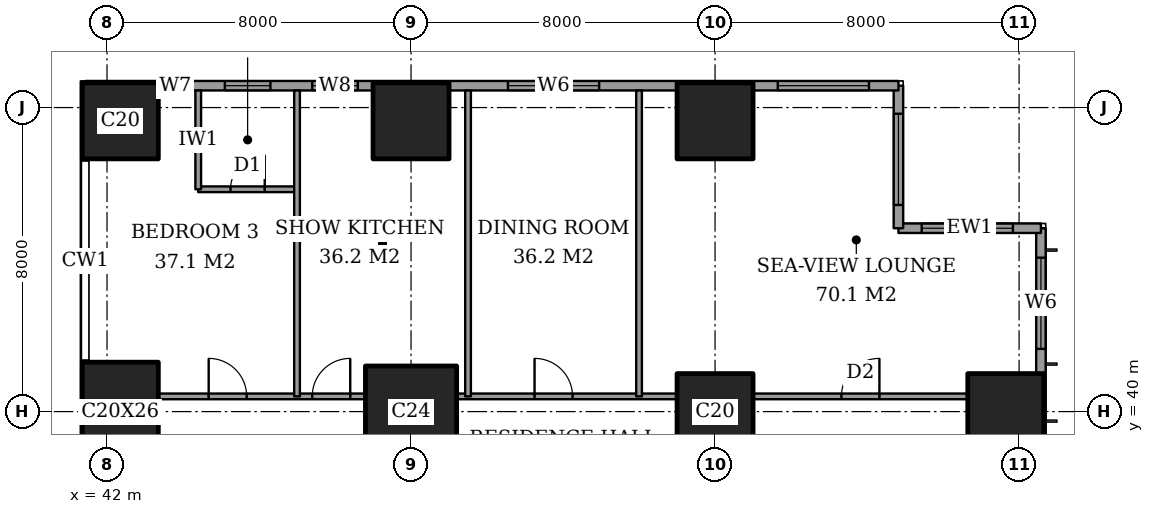
"""IFC4 building model, lengths in metres.
Left out: names, types, materials, properties, quantities, classifications, styles, units other than length and angle.
Written with IfcOpenShell. Run it as: python <this file> out.ifc"""

import sys

from ifc_helpers import new_model, si_unit, direction, frame, frame_2d, origin, origin_2d, place, context, subcontext, project, spatial, rectangle, extrude, element, fill, save


model = new_model("IFC4")
c1 = context("Model", 3, precision=1e-05, world=origin(), true_north=direction((0.0, 1.0)))
c2 = subcontext(c1, "Body", "Model", "MODEL_VIEW")
j1 = project(units=[si_unit("LENGTHUNIT", "METRE"), si_unit("PLANEANGLEUNIT", "RADIAN")], contexts=[c1])
p1 = place(None, origin())
s1 = spatial("IfcSite", under=j1, at=p1, CompositionType="ELEMENT")
p2 = place(p1, origin())
s2 = spatial("IfcBuilding", under=s1, at=p2, CompositionType="ELEMENT")
p3 = place(p2, frame((0.0, 0.0, 72.8)))
s3 = spatial("IfcBuildingStorey", under=s2, at=p3, CompositionType="ELEMENT", Elevation=72.8)
p4 = place(p3, frame((42.35, 40.0, 0.0), z_axis=(0.0, 0.0, 1.0), x_axis=(1.0, 0.0, 0.0)))
e1 = element("IfcColumn", 1, at=p4, inside=s3, PredefinedType="COLUMN", context=c2, shape_type="SweptSolid", body=[
    extrude(rectangle(XDim=2.0, YDim=2.6, at=origin_2d()), origin(), (0.0, 0.0, 1.0), 3.6),
])
p5 = place(p3, frame((42.35, 47.65, 0.0), z_axis=(0.0, 0.0, 1.0), x_axis=(1.0, 0.0, 0.0)))
e2 = element("IfcColumn", 2, at=p5, inside=s3, PredefinedType="COLUMN", context=c2, shape_type="SweptSolid", body=[
    extrude(rectangle(XDim=2.0, YDim=2.0, at=origin_2d()), origin(), (0.0, 0.0, 1.0), 3.6),
])
p6 = place(p3, frame((50.0, 40.0, 0.0), z_axis=(0.0, 0.0, 1.0), x_axis=(1.0, 0.0, 0.0)))
e3 = element("IfcColumn", 3, at=p6, inside=s3, PredefinedType="COLUMN", context=c2, shape_type="SweptSolid", body=[
    extrude(rectangle(XDim=2.4, YDim=2.4, at=origin_2d()), origin(), (0.0, 0.0, 1.0), 3.6),
])
for number, where, z_axis, x_axis in (
    (4, (50.0, 47.65, 0.0), (0.0, 0.0, 1.0), (1.0, 0.0, 0.0)),
    (5, (58.0, 40.0, 0.0), (0.0, 0.0, 1.0), (1.0, 0.0, 0.0)),
    (6, (58.0, 47.65, 0.0), (0.0, 0.0, 1.0), (1.0, 0.0, 0.0)),
    (7, (65.65, 40.0, 0.0), (0.0, 0.0, 1.0), (1.0, 0.0, 0.0)),
):
    element("IfcColumn", number, at=place(p3, frame(where, z_axis=z_axis, x_axis=x_axis)), inside=s3, PredefinedType="COLUMN", context=c2, shape_type="SweptSolid", body=[
        extrude(rectangle(XDim=2.0, YDim=2.0, at=origin_2d()), origin(), (0.0, 0.0, 1.0), 3.6),
    ])
p7 = place(p3, frame((66.575, 3.175, 0.0), z_axis=(0.0, 0.0, 1.0), x_axis=(0.0, 1.0, 0.0)))
e8 = element("IfcWall", 8, at=p7, inside=s3, PredefinedType="SOLIDWALL", context=c2, shape_type="SweptSolid", body=[
    extrude(rectangle(XDim=41.65, YDim=0.25, at=frame_2d((20.825, 0.0))), origin(), (0.0, 0.0, 1.0), 3.6),
])
p8 = place(p7, frame((0.775, 0.0, 0.6)))
e9 = element("IfcOpeningElement", 9, at=p8, cuts=e8, PredefinedType="OPENING", context=c2, shape_type="SweptSolid", body=[
    extrude(rectangle(XDim=2.4, YDim=2.0, at=frame_2d((1.2, 1.0))), frame((0.0, 0.135, 0.0), z_axis=(0.0, -1.0, 0.0), x_axis=(1.0, 0.0, 0.0)), (0.0, 0.0, 1.0), 0.27),
])
p9 = place(p7, frame((6.1, 0.0, 0.6)))
e10 = element("IfcOpeningElement", 10, at=p9, cuts=e8, PredefinedType="OPENING", context=c2, shape_type="SweptSolid", body=[
    extrude(rectangle(XDim=1.2, YDim=2.0, at=frame_2d((0.6, 1.0))), frame((0.0, 0.135, 0.0), z_axis=(0.0, -1.0, 0.0), x_axis=(1.0, 0.0, 0.0)), (0.0, 0.0, 1.0), 0.27),
])
p10 = place(p7, frame((8.275, 0.0, 0.6)))
e11 = element("IfcOpeningElement", 11, at=p10, cuts=e8, PredefinedType="OPENING", context=c2, shape_type="SweptSolid", body=[
    extrude(rectangle(XDim=2.4, YDim=2.0, at=frame_2d((1.2, 1.0))), frame((0.0, 0.135, 0.0), z_axis=(0.0, -1.0, 0.0), x_axis=(1.0, 0.0, 0.0)), (0.0, 0.0, 1.0), 0.27),
])
p11 = place(p7, frame((15.775, 0.0, 0.6)))
e12 = element("IfcOpeningElement", 12, at=p11, cuts=e8, PredefinedType="OPENING", context=c2, shape_type="SweptSolid", body=[
    extrude(rectangle(XDim=2.4, YDim=2.0, at=frame_2d((1.2, 1.0))), frame((0.0, 0.135, 0.0), z_axis=(0.0, -1.0, 0.0), x_axis=(1.0, 0.0, 0.0)), (0.0, 0.0, 1.0), 0.27),
])
p12 = place(p7, frame((23.475, 0.0, 0.6)))
e13 = element("IfcOpeningElement", 13, at=p12, cuts=e8, PredefinedType="OPENING", context=c2, shape_type="SweptSolid", body=[
    extrude(rectangle(XDim=2.4, YDim=2.0, at=frame_2d((1.2, 1.0))), frame((0.0, 0.135, 0.0), z_axis=(0.0, -1.0, 0.0), x_axis=(1.0, 0.0, 0.0)), (0.0, 0.0, 1.0), 0.27),
])
p13 = place(p7, frame((30.975, 0.0, 0.6)))
e14 = element("IfcOpeningElement", 14, at=p13, cuts=e8, PredefinedType="OPENING", context=c2, shape_type="SweptSolid", body=[
    extrude(rectangle(XDim=2.4, YDim=2.0, at=frame_2d((1.2, 1.0))), frame((0.0, 0.135, 0.0), z_axis=(0.0, -1.0, 0.0), x_axis=(1.0, 0.0, 0.0)), (0.0, 0.0, 1.0), 0.27),
])
p14 = place(p7, frame((34.5, 0.0, 0.6)))
e15 = element("IfcOpeningElement", 15, at=p14, cuts=e8, PredefinedType="OPENING", context=c2, shape_type="SweptSolid", body=[
    extrude(rectangle(XDim=1.2, YDim=2.0, at=frame_2d((0.6, 1.0))), frame((0.0, 0.135, 0.0), z_axis=(0.0, -1.0, 0.0), x_axis=(1.0, 0.0, 0.0)), (0.0, 0.0, 1.0), 0.27),
])
p15 = place(p7, frame((38.475, 0.0, 0.6)))
e16 = element("IfcOpeningElement", 16, at=p15, cuts=e8, PredefinedType="OPENING", context=c2, shape_type="SweptSolid", body=[
    extrude(rectangle(XDim=2.4, YDim=2.0, at=frame_2d((1.2, 1.0))), frame((0.0, 0.135, 0.0), z_axis=(0.0, -1.0, 0.0), x_axis=(1.0, 0.0, 0.0)), (0.0, 0.0, 1.0), 0.27),
])
p16 = place(p3, frame((66.575, 44.825, 0.0), z_axis=(0.0, 0.0, 1.0), x_axis=(-1.0, 0.0, 0.0)))
e17 = element("IfcWall", 17, at=p16, inside=s3, PredefinedType="SOLIDWALL", context=c2, shape_type="SweptSolid", body=[
    extrude(rectangle(XDim=3.75, YDim=0.25, at=frame_2d((1.875, 0.0))), origin(), (0.0, 0.0, 1.0), 3.6),
])
p17 = place(p16, frame((0.738, 0.0, 0.6)))
e18 = element("IfcOpeningElement", 18, at=p17, cuts=e17, PredefinedType="OPENING", context=c2, shape_type="SweptSolid", body=[
    extrude(rectangle(XDim=2.4, YDim=2.0, at=frame_2d((1.2, 1.0))), frame((0.0, 0.135, 0.0), z_axis=(0.0, -1.0, 0.0), x_axis=(1.0, 0.0, 0.0)), (0.0, 0.0, 1.0), 0.27),
])
p18 = place(p3, frame((62.825, 44.825, 0.0), z_axis=(0.0, 0.0, 1.0), x_axis=(0.0, 1.0, 0.0)))
e19 = element("IfcWall", 19, at=p18, inside=s3, PredefinedType="SOLIDWALL", context=c2, shape_type="SweptSolid", body=[
    extrude(rectangle(XDim=3.75, YDim=0.25, at=frame_2d((1.875, 0.0))), origin(), (0.0, 0.0, 1.0), 3.6),
])
p19 = place(p18, frame((0.613, 0.0, 0.6)))
e20 = element("IfcOpeningElement", 20, at=p19, cuts=e19, PredefinedType="OPENING", context=c2, shape_type="SweptSolid", body=[
    extrude(rectangle(XDim=2.4, YDim=2.0, at=frame_2d((1.2, 1.0))), frame((0.0, 0.135, 0.0), z_axis=(0.0, -1.0, 0.0), x_axis=(1.0, 0.0, 0.0)), (0.0, 0.0, 1.0), 0.27),
])
p20 = place(p3, frame((62.825, 48.575, 0.0), z_axis=(0.0, 0.0, 1.0), x_axis=(-1.0, 0.0, 0.0)))
e21 = element("IfcWall", 21, at=p20, inside=s3, PredefinedType="SOLIDWALL", context=c2, shape_type="SweptSolid", body=[
    extrude(rectangle(XDim=21.4, YDim=0.25, at=frame_2d((10.7, 0.0))), origin(), (0.0, 0.0, 1.0), 3.6),
])
p21 = place(p20, frame((0.775, 0.0, 0.6)))
e22 = element("IfcOpeningElement", 22, at=p21, cuts=e21, PredefinedType="OPENING", context=c2, shape_type="SweptSolid", body=[
    extrude(rectangle(XDim=2.4, YDim=2.0, at=frame_2d((1.2, 1.0))), frame((0.0, 0.135, 0.0), z_axis=(0.0, -1.0, 0.0), x_axis=(1.0, 0.0, 0.0)), (0.0, 0.0, 1.0), 0.27),
])
p22 = place(p20, frame((7.875, 0.0, 0.6)))
e23 = element("IfcOpeningElement", 23, at=p22, cuts=e21, PredefinedType="OPENING", context=c2, shape_type="SweptSolid", body=[
    extrude(rectangle(XDim=2.4, YDim=2.0, at=frame_2d((1.2, 1.0))), frame((0.0, 0.135, 0.0), z_axis=(0.0, -1.0, 0.0), x_axis=(1.0, 0.0, 0.0)), (0.0, 0.0, 1.0), 0.27),
])
p23 = place(p20, frame((14.225, 0.0, 0.6)))
e24 = element("IfcOpeningElement", 24, at=p23, cuts=e21, PredefinedType="OPENING", context=c2, shape_type="SweptSolid", body=[
    extrude(rectangle(XDim=1.2, YDim=2.0, at=frame_2d((0.6, 1.0))), frame((0.0, 0.135, 0.0), z_axis=(0.0, -1.0, 0.0), x_axis=(1.0, 0.0, 0.0)), (0.0, 0.0, 1.0), 0.27),
])
p24 = place(p20, frame((16.525, 0.0, 0.6)))
e25 = element("IfcOpeningElement", 25, at=p24, cuts=e21, PredefinedType="OPENING", context=c2, shape_type="SweptSolid", body=[
    extrude(rectangle(XDim=1.2, YDim=2.0, at=frame_2d((0.6, 1.0))), frame((0.0, 0.135, 0.0), z_axis=(0.0, -1.0, 0.0), x_axis=(1.0, 0.0, 0.0)), (0.0, 0.0, 1.0), 0.27),
])
p25 = place(p20, frame((18.725, 0.0, 0.6)))
e26 = element("IfcOpeningElement", 26, at=p25, cuts=e21, PredefinedType="OPENING", context=c2, shape_type="SweptSolid", body=[
    extrude(rectangle(XDim=0.6, YDim=2.0, at=frame_2d((0.3, 1.0))), frame((0.0, 0.135, 0.0), z_axis=(0.0, -1.0, 0.0), x_axis=(1.0, 0.0, 0.0)), (0.0, 0.0, 1.0), 0.27),
])
p26 = place(p3, frame((43.35, 40.4, 0.0), z_axis=(0.0, 0.0, 1.0), x_axis=(1.0, 0.0, 0.0)))
e27 = element("IfcWall", 27, at=p26, inside=s3, PredefinedType="PARTITIONING", context=c2, shape_type="SweptSolid", body=[
    extrude(rectangle(XDim=5.45, YDim=0.15, at=frame_2d((2.725, 0.0))), origin(), (0.0, 0.0, 1.0), 3.35),
])
p27 = place(p26, frame((4.05, 0.0, 0.0)))
e28 = element("IfcOpeningElement", 28, at=p27, cuts=e27, PredefinedType="OPENING", context=c2, shape_type="SweptSolid", body=[
    extrude(rectangle(XDim=1.0, YDim=2.1, at=frame_2d((0.5, 1.05))), frame((0.0, 0.085, 0.0), z_axis=(0.0, -1.0, 0.0), x_axis=(1.0, 0.0, 0.0)), (0.0, 0.0, 1.0), 0.17),
])
p28 = place(p26, frame((1.325, 0.0, 0.0)))
e29 = element("IfcOpeningElement", 29, at=p28, cuts=e27, PredefinedType="OPENING", context=c2, shape_type="SweptSolid", body=[
    extrude(rectangle(XDim=1.0, YDim=2.1, at=frame_2d((0.5, 1.05))), frame((0.0, 0.085, 0.0), z_axis=(0.0, -1.0, 0.0), x_axis=(1.0, 0.0, 0.0)), (0.0, 0.0, 1.0), 0.17),
])
p29 = place(p3, frame((51.2, 40.4, 0.0), z_axis=(0.0, 0.0, 1.0), x_axis=(1.0, 0.0, 0.0)))
e30 = element("IfcWall", 30, at=p29, inside=s3, PredefinedType="PARTITIONING", context=c2, shape_type="SweptSolid", body=[
    extrude(rectangle(XDim=5.8, YDim=0.15, at=frame_2d((2.9, 0.0))), origin(), (0.0, 0.0, 1.0), 3.35),
])
p30 = place(p29, frame((2.05, 0.0, 0.0)))
e31 = element("IfcOpeningElement", 31, at=p30, cuts=e30, PredefinedType="OPENING", context=c2, shape_type="SweptSolid", body=[
    extrude(rectangle(XDim=1.0, YDim=2.1, at=frame_2d((0.5, 1.05))), frame((0.0, 0.085, 0.0), z_axis=(0.0, -1.0, 0.0), x_axis=(1.0, 0.0, 0.0)), (0.0, 0.0, 1.0), 0.17),
])
p31 = place(p3, frame((59.0, 40.4, 0.0), z_axis=(0.0, 0.0, 1.0), x_axis=(1.0, 0.0, 0.0)))
e32 = element("IfcWall", 32, at=p31, inside=s3, PredefinedType="PARTITIONING", context=c2, shape_type="SweptSolid", body=[
    extrude(rectangle(XDim=5.65, YDim=0.15, at=frame_2d((2.825, 0.0))), origin(), (0.0, 0.0, 1.0), 3.35),
])
p32 = place(p31, frame((2.325, 0.0, 0.0)))
e33 = element("IfcOpeningElement", 33, at=p32, cuts=e32, PredefinedType="OPENING", context=c2, shape_type="SweptSolid", body=[
    extrude(rectangle(XDim=1.0, YDim=2.1, at=frame_2d((0.5, 1.05))), frame((0.0, 0.085, 0.0), z_axis=(0.0, -1.0, 0.0), x_axis=(1.0, 0.0, 0.0)), (0.0, 0.0, 1.0), 0.17),
])
p33 = place(p3, frame((44.4, 45.85, 0.0), z_axis=(0.0, 0.0, 1.0), x_axis=(1.0, 0.0, 0.0)))
e34 = element("IfcWall", 34, at=p33, inside=s3, PredefinedType="PARTITIONING", context=c2, shape_type="SweptSolid", body=[
    extrude(rectangle(XDim=2.6, YDim=0.15, at=frame_2d((1.3, 0.0))), origin(), (0.0, 0.0, 1.0), 3.35),
])
p34 = place(p33, frame((0.85, 0.0, 0.0)))
e35 = element("IfcOpeningElement", 35, at=p34, cuts=e34, PredefinedType="OPENING", context=c2, shape_type="SweptSolid", body=[
    extrude(rectangle(XDim=0.9, YDim=2.1, at=frame_2d((0.45, 1.05))), frame((0.0, 0.085, 0.0), z_axis=(0.0, -1.0, 0.0), x_axis=(1.0, 0.0, 0.0)), (0.0, 0.0, 1.0), 0.17),
])
p35 = place(p3, frame((44.4, 45.85, 0.0), z_axis=(0.0, 0.0, 1.0), x_axis=(0.0, 1.0, 0.0)))
e36 = element("IfcWall", 36, at=p35, inside=s3, PredefinedType="PARTITIONING", context=c2, shape_type="SweptSolid", body=[
    extrude(rectangle(XDim=2.6, YDim=0.15, at=frame_2d((1.3, 0.0))), origin(), (0.0, 0.0, 1.0), 3.35),
])
for number, where, z_axis, x_axis in (
    (37, (47.0, 40.4, 0.0), (0.0, 0.0, 1.0), (0.0, 1.0, 0.0)),
    (38, (51.5, 40.4, 0.0), (0.0, 0.0, 1.0), (0.0, 1.0, 0.0)),
    (39, (56.0, 40.4, 0.0), (0.0, 0.0, 1.0), (0.0, 1.0, 0.0)),
):
    element("IfcWall", number, at=place(p3, frame(where, z_axis=z_axis, x_axis=x_axis)), inside=s3, PredefinedType="PARTITIONING", context=c2, shape_type="SweptSolid", body=[
        extrude(rectangle(XDim=8.05, YDim=0.15, at=frame_2d((4.025, 0.0))), origin(), (0.0, 0.0, 1.0), 3.35),
    ])
p36 = place(p15, origin())
e40 = element("IfcWindow", 40, at=p36, inside=s3, PartitioningType="SINGLE_PANEL", PredefinedType="WINDOW", context=c2, shape_type="SweptSolid", body=[
    extrude(rectangle(XDim=2.4, YDim=2.0, at=frame_2d((1.2, 1.0))), frame((0.0, 0.03, 0.0), z_axis=(0.0, -1.0, 0.0), x_axis=(1.0, 0.0, 0.0)), (0.0, 0.0, 1.0), 0.06),
])
fill(e16, e40)
p37 = place(p17, origin())
e41 = element("IfcWindow", 41, at=p37, inside=s3, PartitioningType="SINGLE_PANEL", PredefinedType="WINDOW", context=c2, shape_type="SweptSolid", body=[
    extrude(rectangle(XDim=2.4, YDim=2.0, at=frame_2d((1.2, 1.0))), frame((0.0, 0.03, 0.0), z_axis=(0.0, -1.0, 0.0), x_axis=(1.0, 0.0, 0.0)), (0.0, 0.0, 1.0), 0.06),
])
fill(e18, e41)
p38 = place(p19, origin())
e42 = element("IfcWindow", 42, at=p38, inside=s3, PartitioningType="SINGLE_PANEL", PredefinedType="WINDOW", context=c2, shape_type="SweptSolid", body=[
    extrude(rectangle(XDim=2.4, YDim=2.0, at=frame_2d((1.2, 1.0))), frame((0.0, 0.03, 0.0), z_axis=(0.0, -1.0, 0.0), x_axis=(1.0, 0.0, 0.0)), (0.0, 0.0, 1.0), 0.06),
])
fill(e20, e42)
p39 = place(p21, origin())
e43 = element("IfcWindow", 43, at=p39, inside=s3, PartitioningType="SINGLE_PANEL", PredefinedType="WINDOW", context=c2, shape_type="SweptSolid", body=[
    extrude(rectangle(XDim=2.4, YDim=2.0, at=frame_2d((1.2, 1.0))), frame((0.0, 0.03, 0.0), z_axis=(0.0, -1.0, 0.0), x_axis=(1.0, 0.0, 0.0)), (0.0, 0.0, 1.0), 0.06),
])
fill(e22, e43)
p40 = place(p22, origin())
e44 = element("IfcWindow", 44, at=p40, inside=s3, PartitioningType="SINGLE_PANEL", PredefinedType="WINDOW", context=c2, shape_type="SweptSolid", body=[
    extrude(rectangle(XDim=2.4, YDim=2.0, at=frame_2d((1.2, 1.0))), frame((0.0, 0.03, 0.0), z_axis=(0.0, -1.0, 0.0), x_axis=(1.0, 0.0, 0.0)), (0.0, 0.0, 1.0), 0.06),
])
fill(e23, e44)
p41 = place(p23, origin())
e45 = element("IfcWindow", 45, at=p41, inside=s3, PartitioningType="SINGLE_PANEL", PredefinedType="WINDOW", context=c2, shape_type="SweptSolid", body=[
    extrude(rectangle(XDim=1.2, YDim=2.0, at=frame_2d((0.6, 1.0))), frame((0.0, 0.03, 0.0), z_axis=(0.0, -1.0, 0.0), x_axis=(1.0, 0.0, 0.0)), (0.0, 0.0, 1.0), 0.06),
])
fill(e24, e45)
p42 = place(p24, origin())
e46 = element("IfcWindow", 46, at=p42, inside=s3, PartitioningType="SINGLE_PANEL", PredefinedType="WINDOW", context=c2, shape_type="SweptSolid", body=[
    extrude(rectangle(XDim=1.2, YDim=2.0, at=frame_2d((0.6, 1.0))), frame((0.0, 0.03, 0.0), z_axis=(0.0, -1.0, 0.0), x_axis=(1.0, 0.0, 0.0)), (0.0, 0.0, 1.0), 0.06),
])
fill(e25, e46)
p43 = place(p25, origin())
e47 = element("IfcWindow", 47, at=p43, inside=s3, PartitioningType="SINGLE_PANEL", PredefinedType="WINDOW", context=c2, shape_type="SweptSolid", body=[
    extrude(rectangle(XDim=0.6, YDim=2.0, at=frame_2d((0.3, 1.0))), frame((0.0, 0.03, 0.0), z_axis=(0.0, -1.0, 0.0), x_axis=(1.0, 0.0, 0.0)), (0.0, 0.0, 1.0), 0.06),
])
fill(e26, e47)
p44 = place(p32, origin())
e48 = element("IfcDoor", 48, at=p44, inside=s3, OperationType="SINGLE_SWING_LEFT", PredefinedType="DOOR", context=c2, shape_type="SweptSolid", body=[
    extrude(rectangle(XDim=1.0, YDim=2.1, at=frame_2d((0.5, 1.05))), frame((0.0, 0.025, 0.0), z_axis=(0.0, -1.0, 0.0), x_axis=(1.0, 0.0, 0.0)), (0.0, 0.0, 1.0), 0.05),
])
fill(e33, e48)
p45 = place(p30, origin())
e49 = element("IfcDoor", 49, at=p45, inside=s3, OperationType="SINGLE_SWING_RIGHT", PredefinedType="DOOR", context=c2, shape_type="SweptSolid", body=[
    extrude(rectangle(XDim=1.0, YDim=2.1, at=frame_2d((0.5, 1.05))), frame((0.0, 0.025, 0.0), z_axis=(0.0, -1.0, 0.0), x_axis=(1.0, 0.0, 0.0)), (0.0, 0.0, 1.0), 0.05),
])
fill(e31, e49)
p46 = place(p27, origin())
e50 = element("IfcDoor", 50, at=p46, inside=s3, OperationType="SINGLE_SWING_LEFT", PredefinedType="DOOR", context=c2, shape_type="SweptSolid", body=[
    extrude(rectangle(XDim=1.0, YDim=2.1, at=frame_2d((0.5, 1.05))), frame((0.0, 0.025, 0.0), z_axis=(0.0, -1.0, 0.0), x_axis=(1.0, 0.0, 0.0)), (0.0, 0.0, 1.0), 0.05),
])
fill(e28, e50)
p47 = place(p34, origin())
e51 = element("IfcDoor", 51, at=p47, inside=s3, OperationType="SINGLE_SWING_LEFT", PredefinedType="DOOR", context=c2, shape_type="SweptSolid", body=[
    extrude(rectangle(XDim=0.9, YDim=2.1, at=frame_2d((0.45, 1.05))), frame((0.0, 0.025, 0.0), z_axis=(0.0, -1.0, 0.0), x_axis=(1.0, 0.0, 0.0)), (0.0, 0.0, 1.0), 0.05),
])
fill(e35, e51)
p48 = place(p28, origin())
e52 = element("IfcDoor", 52, at=p48, inside=s3, OperationType="SINGLE_SWING_RIGHT", PredefinedType="DOOR", context=c2, shape_type="SweptSolid", body=[
    extrude(rectangle(XDim=1.0, YDim=2.1, at=frame_2d((0.5, 1.05))), frame((0.0, 0.025, 0.0), z_axis=(0.0, -1.0, 0.0), x_axis=(1.0, 0.0, 0.0)), (0.0, 0.0, 1.0), 0.05),
])
fill(e29, e52)
save(model, sys.argv[1])
